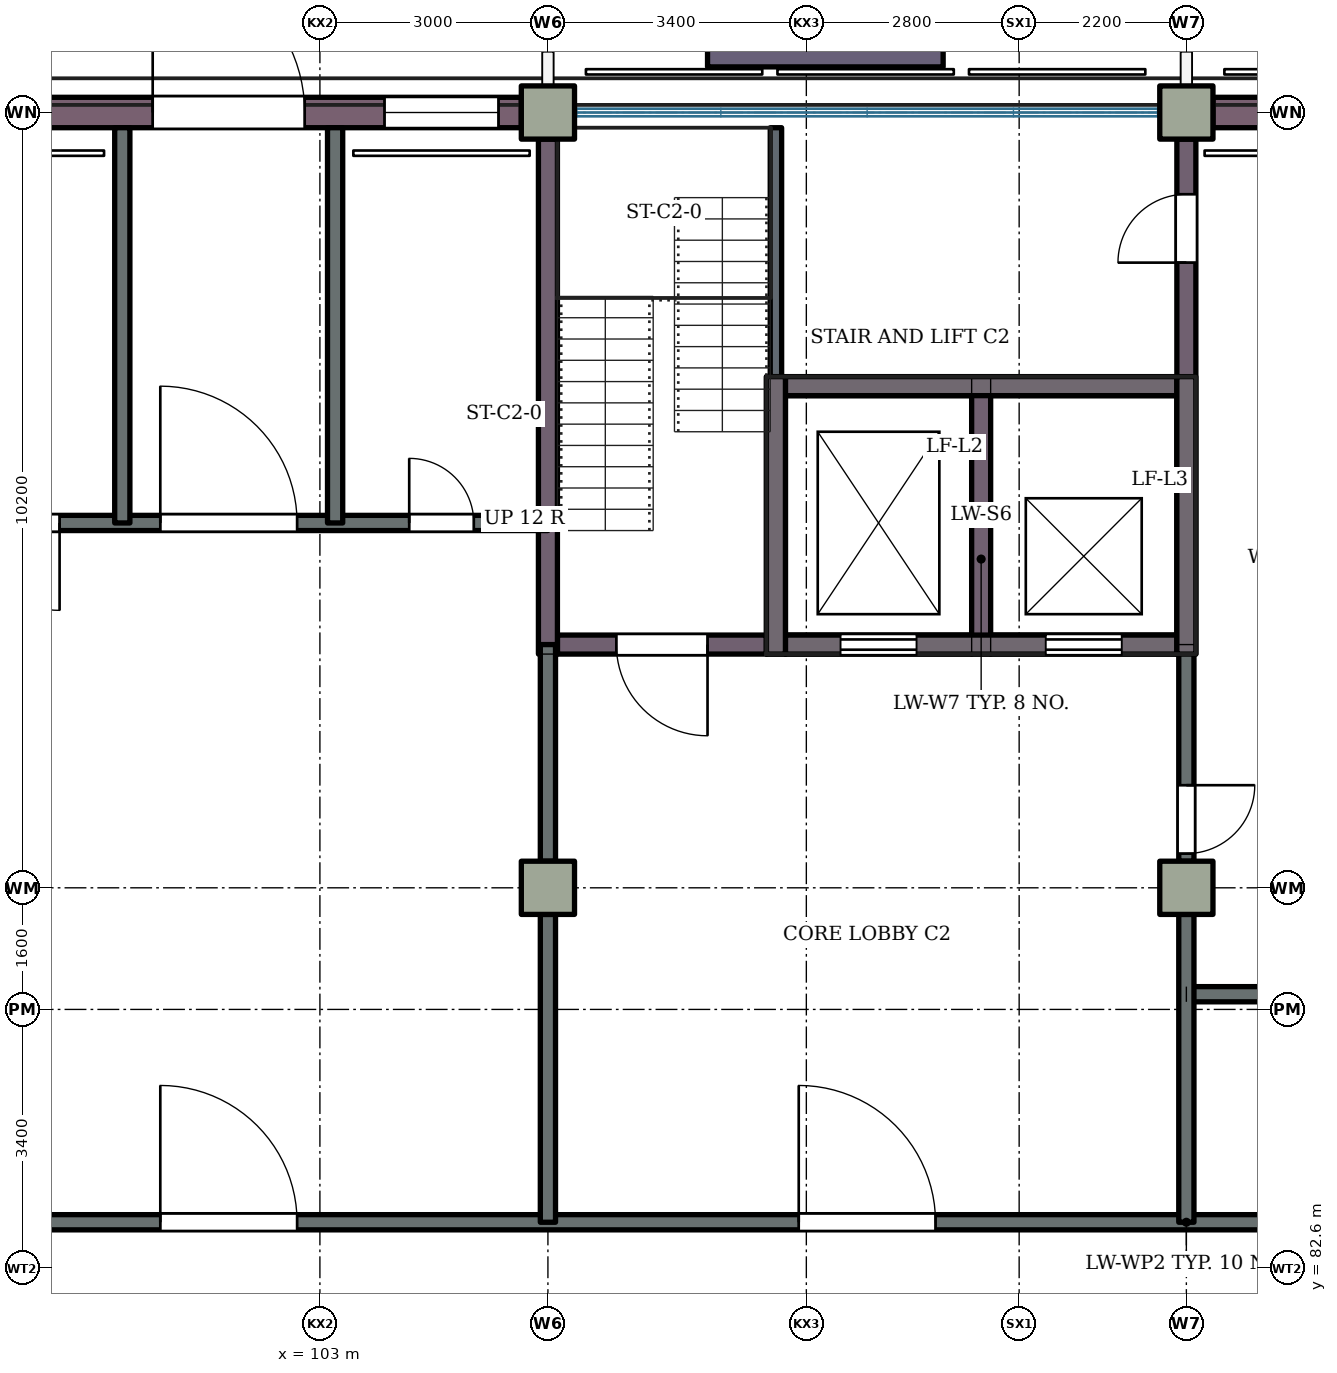
"""IFC4 building model, lengths in metres.
Left out: names, types, materials, properties, quantities, classifications, styles, units other than length and angle.
Written with IfcOpenShell. Run it as: python <this file> out.ifc"""

import sys

from ifc_helpers import new_model, si_unit, direction, frame, frame_2d, origin, origin_2d, place, context, subcontext, project, spatial, rectangle, extrude, element, fill, save


model = new_model("IFC4")
c1 = context("Model", 3, precision=1e-05, world=origin(), true_north=direction((0.0, 1.0)))
c2 = subcontext(c1, "Body", "Model", "MODEL_VIEW")
j1 = project(units=[si_unit("LENGTHUNIT", "METRE"), si_unit("PLANEANGLEUNIT", "RADIAN")], contexts=[c1])
p1 = place(None, origin())
s1 = spatial("IfcSite", under=j1, at=p1, CompositionType="ELEMENT")
p2 = place(p1, origin())
s2 = spatial("IfcBuilding", under=s1, at=p2, CompositionType="ELEMENT")
p3 = place(p2, origin())
s3 = spatial("IfcBuildingStorey", under=s2, at=p3, CompositionType="ELEMENT", Elevation=0.0)
for number, where, z_axis, x_axis in (
    (1, (106.0, 87.6, 0.0), (0.0, 0.0, 1.0), (1.0, 0.0, 0.0)),
    (2, (114.4, 87.6, 0.0), (0.0, 0.0, 1.0), (1.0, 0.0, 0.0)),
    (3, (106.0, 97.8, 0.0), (0.0, 0.0, 1.0), (1.0, 0.0, 0.0)),
    (4, (114.4, 97.8, 0.0), (0.0, 0.0, 1.0), (1.0, 0.0, 0.0)),
):
    element("IfcColumn", number, at=place(p3, frame(where, z_axis=z_axis, x_axis=x_axis)), inside=s3, PredefinedType="COLUMN", context=c2, shape_type="SweptSolid", body=[
        extrude(rectangle(XDim=0.7, YDim=0.7, at=origin_2d()), origin(), (0.0, 0.0, 1.0), 4.2),
    ])
p4 = place(p3, frame((106.125, 90.8, 0.0), z_axis=(0.0, 0.0, 1.0), x_axis=(1.0, 0.0, 0.0)))
e5 = element("IfcWall", 5, at=p4, inside=s3, PredefinedType="SHEAR", context=c2, shape_type="SweptSolid", body=[
    extrude(rectangle(XDim=2.75, YDim=0.25, at=frame_2d((1.375, 0.0))), origin(), (0.0, 0.0, 1.0), 4.2),
])
p5 = place(p4, frame((0.775, 0.0, 0.0)))
e6 = element("IfcOpeningElement", 6, at=p5, cuts=e5, PredefinedType="OPENING", context=c2, shape_type="SweptSolid", body=[
    extrude(rectangle(XDim=1.2, YDim=2.1, at=frame_2d((0.6, 1.05))), frame((0.0, 0.135, 0.0), z_axis=(0.0, -1.0, 0.0), x_axis=(1.0, 0.0, 0.0)), (0.0, 0.0, 1.0), 0.27),
])
p6 = place(p3, frame((109.125, 90.8, 0.0), z_axis=(0.0, 0.0, 1.0), x_axis=(1.0, 0.0, 0.0)))
e7 = element("IfcWall", 7, at=p6, inside=s3, PredefinedType="SHEAR", context=c2, shape_type="SweptSolid", body=[
    extrude(rectangle(XDim=2.45, YDim=0.25, at=frame_2d((1.225, 0.0))), origin(), (0.0, 0.0, 1.0), 4.2),
])
p7 = place(p6, frame((0.725, 0.0, 0.0)))
e8 = element("IfcOpeningElement", 8, at=p7, cuts=e7, PredefinedType="OPENING", context=c2, shape_type="SweptSolid", body=[
    extrude(rectangle(XDim=1.0, YDim=2.1, at=frame_2d((0.5, 1.05))), frame((0.0, 0.135, 0.0), z_axis=(0.0, -1.0, 0.0), x_axis=(1.0, 0.0, 0.0)), (0.0, 0.0, 1.0), 0.27),
])
p8 = place(p3, frame((111.825, 90.8, 0.0), z_axis=(0.0, 0.0, 1.0), x_axis=(1.0, 0.0, 0.0)))
e9 = element("IfcWall", 9, at=p8, inside=s3, PredefinedType="SHEAR", context=c2, shape_type="SweptSolid", body=[
    extrude(rectangle(XDim=2.45, YDim=0.25, at=frame_2d((1.225, 0.0))), origin(), (0.0, 0.0, 1.0), 4.2),
])
p9 = place(p8, frame((0.725, 0.0, 0.0)))
e10 = element("IfcOpeningElement", 10, at=p9, cuts=e9, PredefinedType="OPENING", context=c2, shape_type="SweptSolid", body=[
    extrude(rectangle(XDim=1.0, YDim=2.1, at=frame_2d((0.5, 1.05))), frame((0.0, 0.135, 0.0), z_axis=(0.0, -1.0, 0.0), x_axis=(1.0, 0.0, 0.0)), (0.0, 0.0, 1.0), 0.27),
])
for number, where, z_axis, x_axis in (
    (11, (109.125, 94.2, 0.0), (0.0, 0.0, 1.0), (1.0, 0.0, 0.0)),
    (12, (111.825, 94.2, 0.0), (0.0, 0.0, 1.0), (1.0, 0.0, 0.0)),
):
    element("IfcWall", number, at=place(p3, frame(where, z_axis=z_axis, x_axis=x_axis)), inside=s3, PredefinedType="SHEAR", context=c2, shape_type="SweptSolid", body=[
        extrude(rectangle(XDim=2.45, YDim=0.25, at=frame_2d((1.225, 0.0))), origin(), (0.0, 0.0, 1.0), 4.2),
    ])
p10 = place(p3, frame((106.0, 90.675, 0.0), z_axis=(0.0, 0.0, 1.0), x_axis=(0.0, 1.0, 0.0)))
e13 = element("IfcWall", 13, at=p10, inside=s3, PredefinedType="SHEAR", context=c2, shape_type="SweptSolid", body=[
    extrude(rectangle(XDim=6.775, YDim=0.25, at=frame_2d((3.387, 0.0))), origin(), (0.0, 0.0, 1.0), 4.2),
])
for number, where, z_axis, x_axis in (
    (14, (109.0, 90.675, 0.0), (0.0, 0.0, 1.0), (0.0, 1.0, 0.0)),
    (15, (111.7, 90.675, 0.0), (0.0, 0.0, 1.0), (0.0, 1.0, 0.0)),
):
    element("IfcWall", number, at=place(p3, frame(where, z_axis=z_axis, x_axis=x_axis)), inside=s3, PredefinedType="SHEAR", context=c2, shape_type="SweptSolid", body=[
        extrude(rectangle(XDim=3.65, YDim=0.25, at=frame_2d((1.825, 0.0))), origin(), (0.0, 0.0, 1.0), 4.2),
    ])
p11 = place(p3, frame((114.4, 90.675, 0.0), z_axis=(0.0, 0.0, 1.0), x_axis=(0.0, 1.0, 0.0)))
e16 = element("IfcWall", 16, at=p11, inside=s3, PredefinedType="SHEAR", context=c2, shape_type="SweptSolid", body=[
    extrude(rectangle(XDim=6.775, YDim=0.25, at=frame_2d((3.387, 0.0))), origin(), (0.0, 0.0, 1.0), 4.2),
])
p12 = place(p11, frame((5.15, 0.0, 0.0)))
e17 = element("IfcOpeningElement", 17, at=p12, cuts=e16, PredefinedType="OPENING", context=c2, shape_type="SweptSolid", body=[
    extrude(rectangle(XDim=0.9, YDim=2.1, at=frame_2d((0.45, 1.05))), frame((0.0, 0.135, 0.0), z_axis=(0.0, -1.0, 0.0), x_axis=(1.0, 0.0, 0.0)), (0.0, 0.0, 1.0), 0.27),
])
p13 = place(p3, frame((97.95, 97.8, 0.0), z_axis=(0.0, 0.0, 1.0), x_axis=(1.0, 0.0, 0.0)))
e18 = element("IfcWall", 18, at=p13, inside=s3, PredefinedType="SOLIDWALL", context=c2, shape_type="SweptSolid", body=[
    extrude(rectangle(XDim=7.7, YDim=0.4, at=frame_2d((3.85, 0.0))), origin(), (0.0, 0.0, 1.0), 3.32),
])
p14 = place(p13, frame((2.85, 0.0, 0.0)))
e19 = element("IfcOpeningElement", 19, at=p14, cuts=e18, PredefinedType="OPENING", context=c2, shape_type="SweptSolid", body=[
    extrude(rectangle(XDim=2.0, YDim=2.4, at=frame_2d((1.0, 1.2))), frame((0.0, 0.21, 0.0), z_axis=(0.0, -1.0, 0.0), x_axis=(1.0, 0.0, 0.0)), (0.0, 0.0, 1.0), 0.42),
])
p15 = place(p13, frame((0.675, 0.0, 2.1)))
e20 = element("IfcOpeningElement", 20, at=p15, cuts=e18, PredefinedType="OPENING", context=c2, shape_type="SweptSolid", body=[
    extrude(rectangle(XDim=0.75, YDim=0.9, at=frame_2d((0.375, 0.45))), frame((0.0, 0.21, 0.0), z_axis=(0.0, -1.0, 0.0), x_axis=(1.0, 0.0, 0.0)), (0.0, 0.0, 1.0), 0.42),
])
p16 = place(p13, frame((5.9, 0.0, 1.5)))
e21 = element("IfcOpeningElement", 21, at=p16, cuts=e18, PredefinedType="OPENING", context=c2, shape_type="SweptSolid", body=[
    extrude(rectangle(XDim=1.5, YDim=1.5, at=frame_2d((0.75, 0.75))), frame((0.0, 0.21, 0.0), z_axis=(0.0, -1.0, 0.0), x_axis=(1.0, 0.0, 0.0)), (0.0, 0.0, 1.0), 0.42),
])
p17 = place(p3, frame((114.75, 97.8, 0.0), z_axis=(0.0, 0.0, 1.0), x_axis=(1.0, 0.0, 0.0)))
e22 = element("IfcWall", 22, at=p17, inside=s3, PredefinedType="SOLIDWALL", context=c2, shape_type="SweptSolid", body=[
    extrude(rectangle(XDim=7.7, YDim=0.4, at=frame_2d((3.85, 0.0))), origin(), (0.0, 0.0, 1.0), 3.32),
])
p18 = place(p17, frame((0.75, 0.0, 2.1)))
e23 = element("IfcOpeningElement", 23, at=p18, cuts=e22, PredefinedType="OPENING", context=c2, shape_type="SweptSolid", body=[
    extrude(rectangle(XDim=0.6, YDim=0.9, at=frame_2d((0.3, 0.45))), frame((0.0, 0.21, 0.0), z_axis=(0.0, -1.0, 0.0), x_axis=(1.0, 0.0, 0.0)), (0.0, 0.0, 1.0), 0.42),
])
p19 = place(p17, frame((6.35, 0.0, 2.1)))
e24 = element("IfcOpeningElement", 24, at=p19, cuts=e22, PredefinedType="OPENING", context=c2, shape_type="SweptSolid", body=[
    extrude(rectangle(XDim=0.6, YDim=0.9, at=frame_2d((0.3, 0.45))), frame((0.0, 0.21, 0.0), z_axis=(0.0, -1.0, 0.0), x_axis=(1.0, 0.0, 0.0)), (0.0, 0.0, 1.0), 0.42),
])
p20 = place(p3, frame((108.1, 98.9, 0.0), z_axis=(0.0, 0.0, 1.0), x_axis=(1.0, 0.0, 0.0)))
e25 = element("IfcWall", 25, at=p20, inside=s3, PredefinedType="STANDARD", context=c2, shape_type="SweptSolid", body=[
    extrude(rectangle(XDim=3.1, YDim=1.0, at=frame_2d((1.55, 0.0))), origin(), (0.0, 0.0, 1.0), 4.2),
])
p21 = place(p3, frame((97.6, 83.2, 0.0), z_axis=(0.0, 0.0, 1.0), x_axis=(1.0, 0.0, 0.0)))
e26 = element("IfcWall", 26, at=p21, inside=s3, PredefinedType="PARTITIONING", context=c2, shape_type="SweptSolid", body=[
    extrude(rectangle(XDim=33.6, YDim=0.2, at=frame_2d((16.8, 0.0))), origin(), (0.0, 0.0, 1.0), 3.92),
])
p22 = place(p21, frame((3.3, 0.0, 0.0)))
e27 = element("IfcOpeningElement", 27, at=p22, cuts=e26, PredefinedType="OPENING", context=c2, shape_type="SweptSolid", body=[
    extrude(rectangle(XDim=1.8, YDim=2.1, at=frame_2d((0.9, 1.05))), frame((0.0, 0.11, 0.0), z_axis=(0.0, -1.0, 0.0), x_axis=(1.0, 0.0, 0.0)), (0.0, 0.0, 1.0), 0.22),
])
p23 = place(p21, frame((11.7, 0.0, 0.0)))
e28 = element("IfcOpeningElement", 28, at=p23, cuts=e26, PredefinedType="OPENING", context=c2, shape_type="SweptSolid", body=[
    extrude(rectangle(XDim=1.8, YDim=2.1, at=frame_2d((0.9, 1.05))), frame((0.0, 0.11, 0.0), z_axis=(0.0, -1.0, 0.0), x_axis=(1.0, 0.0, 0.0)), (0.0, 0.0, 1.0), 0.22),
])
p24 = place(p21, frame((20.1, 0.0, 0.0)))
e29 = element("IfcOpeningElement", 29, at=p24, cuts=e26, PredefinedType="OPENING", context=c2, shape_type="SweptSolid", body=[
    extrude(rectangle(XDim=1.8, YDim=2.1, at=frame_2d((0.9, 1.05))), frame((0.0, 0.11, 0.0), z_axis=(0.0, -1.0, 0.0), x_axis=(1.0, 0.0, 0.0)), (0.0, 0.0, 1.0), 0.22),
])
p25 = place(p21, frame((28.5, 0.0, 0.0)))
e30 = element("IfcOpeningElement", 30, at=p25, cuts=e26, PredefinedType="OPENING", context=c2, shape_type="SweptSolid", body=[
    extrude(rectangle(XDim=1.8, YDim=2.1, at=frame_2d((0.9, 1.05))), frame((0.0, 0.11, 0.0), z_axis=(0.0, -1.0, 0.0), x_axis=(1.0, 0.0, 0.0)), (0.0, 0.0, 1.0), 0.22),
])
p26 = place(p3, frame((114.4, 86.2, 0.0), z_axis=(0.0, 0.0, 1.0), x_axis=(1.0, 0.0, 0.0)))
e31 = element("IfcWall", 31, at=p26, inside=s3, PredefinedType="PARTITIONING", context=c2, shape_type="SweptSolid", body=[
    extrude(rectangle(XDim=8.4, YDim=0.2, at=frame_2d((4.2, 0.0))), origin(), (0.0, 0.0, 1.0), 3.92),
])
p27 = place(p26, frame((1.65, 0.0, 0.0)))
e32 = element("IfcOpeningElement", 32, at=p27, cuts=e31, PredefinedType="OPENING", context=c2, shape_type="SweptSolid", body=[
    extrude(rectangle(XDim=0.9, YDim=2.1, at=frame_2d((0.45, 1.05))), frame((0.0, 0.11, 0.0), z_axis=(0.0, -1.0, 0.0), x_axis=(1.0, 0.0, 0.0)), (0.0, 0.0, 1.0), 0.22),
])
p28 = place(p26, frame((4.35, 0.0, 0.0)))
e33 = element("IfcOpeningElement", 33, at=p28, cuts=e31, PredefinedType="OPENING", context=c2, shape_type="SweptSolid", body=[
    extrude(rectangle(XDim=0.9, YDim=2.1, at=frame_2d((0.45, 1.05))), frame((0.0, 0.11, 0.0), z_axis=(0.0, -1.0, 0.0), x_axis=(1.0, 0.0, 0.0)), (0.0, 0.0, 1.0), 0.22),
])
p29 = place(p3, frame((97.6, 92.4, 0.0), z_axis=(0.0, 0.0, 1.0), x_axis=(1.0, 0.0, 0.0)))
e34 = element("IfcWall", 34, at=p29, inside=s3, PredefinedType="PARTITIONING", context=c2, shape_type="SweptSolid", body=[
    extrude(rectangle(XDim=8.4, YDim=0.2, at=frame_2d((4.2, 0.0))), origin(), (0.0, 0.0, 1.0), 3.92),
])
p30 = place(p29, frame((0.825, 0.0, 0.0)))
e35 = element("IfcOpeningElement", 35, at=p30, cuts=e34, PredefinedType="OPENING", context=c2, shape_type="SweptSolid", body=[
    extrude(rectangle(XDim=1.15, YDim=2.1, at=frame_2d((0.575, 1.05))), frame((0.0, 0.11, 0.0), z_axis=(0.0, -1.0, 0.0), x_axis=(1.0, 0.0, 0.0)), (0.0, 0.0, 1.0), 0.22),
])
p31 = place(p29, frame((6.575, 0.0, 0.0)))
e36 = element("IfcOpeningElement", 36, at=p31, cuts=e34, PredefinedType="OPENING", context=c2, shape_type="SweptSolid", body=[
    extrude(rectangle(XDim=0.85, YDim=2.1, at=frame_2d((0.425, 1.05))), frame((0.0, 0.11, 0.0), z_axis=(0.0, -1.0, 0.0), x_axis=(1.0, 0.0, 0.0)), (0.0, 0.0, 1.0), 0.22),
])
p32 = place(p29, frame((3.3, 0.0, 0.0)))
e37 = element("IfcOpeningElement", 37, at=p32, cuts=e34, PredefinedType="OPENING", context=c2, shape_type="SweptSolid", body=[
    extrude(rectangle(XDim=1.8, YDim=2.1, at=frame_2d((0.9, 1.05))), frame((0.0, 0.11, 0.0), z_axis=(0.0, -1.0, 0.0), x_axis=(1.0, 0.0, 0.0)), (0.0, 0.0, 1.0), 0.22),
])
for number, where, z_axis, x_axis in (
    (38, (100.4, 92.4, 0.0), (0.0, 0.0, 1.0), (0.0, 1.0, 0.0)),
    (39, (103.2, 92.4, 0.0), (0.0, 0.0, 1.0), (0.0, 1.0, 0.0)),
):
    element("IfcWall", number, at=place(p3, frame(where, z_axis=z_axis, x_axis=x_axis)), inside=s3, PredefinedType="PARTITIONING", context=c2, shape_type="SweptSolid", body=[
        extrude(rectangle(XDim=5.2, YDim=0.2, at=frame_2d((2.6, 0.0))), origin(), (0.0, 0.0, 1.0), 3.92),
    ])
p33 = place(p3, frame((106.0, 83.2, 0.0), z_axis=(0.0, 0.0, 1.0), x_axis=(0.0, 1.0, 0.0)))
e40 = element("IfcWall", 40, at=p33, inside=s3, PredefinedType="PARTITIONING", context=c2, shape_type="SweptSolid", body=[
    extrude(rectangle(XDim=4.05, YDim=0.2, at=frame_2d((2.025, 0.0))), origin(), (0.0, 0.0, 1.0), 3.02),
])
p34 = place(p3, frame((106.0, 87.95, 0.0), z_axis=(0.0, 0.0, 1.0), x_axis=(0.0, 1.0, 0.0)))
e41 = element("IfcWall", 41, at=p34, inside=s3, PredefinedType="PARTITIONING", context=c2, shape_type="SweptSolid", body=[
    extrude(rectangle(XDim=2.85, YDim=0.2, at=frame_2d((1.425, 0.0))), origin(), (0.0, 0.0, 1.0), 3.02),
])
p35 = place(p3, frame((114.4, 83.2, 0.0), z_axis=(0.0, 0.0, 1.0), x_axis=(0.0, 1.0, 0.0)))
e42 = element("IfcWall", 42, at=p35, inside=s3, PredefinedType="PARTITIONING", context=c2, shape_type="SweptSolid", body=[
    extrude(rectangle(XDim=4.05, YDim=0.2, at=frame_2d((2.025, 0.0))), origin(), (0.0, 0.0, 1.0), 3.02),
])
p36 = place(p3, frame((114.4, 87.95, 0.0), z_axis=(0.0, 0.0, 1.0), x_axis=(0.0, 1.0, 0.0)))
e43 = element("IfcWall", 43, at=p36, inside=s3, PredefinedType="PARTITIONING", context=c2, shape_type="SweptSolid", body=[
    extrude(rectangle(XDim=2.85, YDim=0.2, at=frame_2d((1.425, 0.0))), origin(), (0.0, 0.0, 1.0), 3.02),
])
p37 = place(p36, frame((0.1, 0.0, 0.0)))
e44 = element("IfcOpeningElement", 44, at=p37, cuts=e43, PredefinedType="OPENING", context=c2, shape_type="SweptSolid", body=[
    extrude(rectangle(XDim=0.9, YDim=2.1, at=frame_2d((0.45, 1.05))), frame((0.0, 0.11, 0.0), z_axis=(0.0, -1.0, 0.0), x_axis=(1.0, 0.0, 0.0)), (0.0, 0.0, 1.0), 0.22),
])
p38 = place(p3, frame((109.0, 94.325, 0.0), z_axis=(0.0, 0.0, 1.0), x_axis=(0.0, 1.0, 0.0)))
e45 = element("IfcWall", 45, at=p38, inside=s3, PredefinedType="PARTITIONING", context=c2, shape_type="SweptSolid", body=[
    extrude(rectangle(XDim=3.275, YDim=0.15, at=frame_2d((1.638, 0.0))), origin(), (0.0, 0.0, 1.0), 3.92),
])
for number, where, z_axis, x_axis in (
    (46, (109.125, 90.8, -1.2), (0.0, 0.0, 1.0), (1.0, 0.0, 0.0)),
    (47, (109.125, 94.2, -1.2), (0.0, 0.0, 1.0), (1.0, 0.0, 0.0)),
):
    element("IfcWall", number, at=place(p3, frame(where, z_axis=z_axis, x_axis=x_axis)), inside=s3, PredefinedType="SOLIDWALL", context=c2, shape_type="SweptSolid", body=[
        extrude(rectangle(XDim=5.15, YDim=0.25, at=frame_2d((2.575, 0.0))), origin(), (0.0, 0.0, 1.0), 1.2),
    ])
for number, where, z_axis, x_axis in (
    (48, (109.0, 90.675, -1.2), (0.0, 0.0, 1.0), (0.0, 1.0, 0.0)),
    (49, (114.4, 90.675, -1.2), (0.0, 0.0, 1.0), (0.0, 1.0, 0.0)),
):
    element("IfcWall", number, at=place(p3, frame(where, z_axis=z_axis, x_axis=x_axis)), inside=s3, PredefinedType="SOLIDWALL", context=c2, shape_type="SweptSolid", body=[
        extrude(rectangle(XDim=3.65, YDim=0.25, at=frame_2d((1.825, 0.0))), origin(), (0.0, 0.0, 1.0), 1.2),
    ])
p39 = place(p14, origin())
e50 = element("IfcDoor", 50, at=p39, inside=s3, OperationType="DOUBLE_DOOR_SINGLE_SWING", PredefinedType="DOOR", context=c2, shape_type="SweptSolid", body=[
    extrude(rectangle(XDim=2.0, YDim=2.4, at=frame_2d((1.0, 1.2))), frame((0.0, 0.025, 0.0), z_axis=(0.0, -1.0, 0.0), x_axis=(1.0, 0.0, 0.0)), (0.0, 0.0, 1.0), 0.05),
])
fill(e19, e50)
p40 = place(p16, origin())
e51 = element("IfcWindow", 51, at=p40, inside=s3, PartitioningType="SINGLE_PANEL", PredefinedType="WINDOW", context=c2, shape_type="SweptSolid", body=[
    extrude(rectangle(XDim=1.5, YDim=1.5, at=frame_2d((0.75, 0.75))), frame((0.0, 0.03, 0.0), z_axis=(0.0, -1.0, 0.0), x_axis=(1.0, 0.0, 0.0)), (0.0, 0.0, 1.0), 0.06),
])
fill(e21, e51)
p41 = place(p30, origin())
e52 = element("IfcDoor", 52, at=p41, inside=s3, OperationType="SINGLE_SWING_RIGHT", PredefinedType="DOOR", context=c2, shape_type="SweptSolid", body=[
    extrude(rectangle(XDim=1.15, YDim=2.1, at=frame_2d((0.575, 1.05))), frame((0.0, 0.025, 0.0), z_axis=(0.0, -1.0, 0.0), x_axis=(1.0, 0.0, 0.0)), (0.0, 0.0, 1.0), 0.05),
])
fill(e35, e52)
p42 = place(p31, origin())
e53 = element("IfcDoor", 53, at=p42, inside=s3, OperationType="SINGLE_SWING_LEFT", PredefinedType="DOOR", context=c2, shape_type="SweptSolid", body=[
    extrude(rectangle(XDim=0.85, YDim=2.1, at=frame_2d((0.425, 1.05))), frame((0.0, 0.025, 0.0), z_axis=(0.0, -1.0, 0.0), x_axis=(1.0, 0.0, 0.0)), (0.0, 0.0, 1.0), 0.05),
])
fill(e36, e53)
p43 = place(p37, origin())
e54 = element("IfcDoor", 54, at=p43, inside=s3, OperationType="SINGLE_SWING_RIGHT", PredefinedType="DOOR", context=c2, shape_type="SweptSolid", body=[
    extrude(rectangle(XDim=0.9, YDim=2.1, at=frame_2d((0.45, 1.05))), frame((0.0, 0.025, 0.0), z_axis=(0.0, -1.0, 0.0), x_axis=(1.0, 0.0, 0.0)), (0.0, 0.0, 1.0), 0.05),
])
fill(e44, e54)
p44 = place(p12, origin())
e55 = element("IfcDoor", 55, at=p44, inside=s3, OperationType="SINGLE_SWING_LEFT", PredefinedType="DOOR", context=c2, shape_type="SweptSolid", body=[
    extrude(rectangle(XDim=0.9, YDim=2.1, at=frame_2d((0.45, 1.05))), frame((0.0, 0.025, 0.0), z_axis=(0.0, -1.0, 0.0), x_axis=(1.0, 0.0, 0.0)), (0.0, 0.0, 1.0), 0.05),
])
fill(e17, e55)
p45 = place(p32, origin())
e56 = element("IfcDoor", 56, at=p45, inside=s3, OperationType="DOUBLE_DOOR_SINGLE_SWING", PredefinedType="DOOR", context=c2, shape_type="SweptSolid", body=[
    extrude(rectangle(XDim=1.8, YDim=2.1, at=frame_2d((0.9, 1.05))), frame((0.0, 0.025, 0.0), z_axis=(0.0, -1.0, 0.0), x_axis=(1.0, 0.0, 0.0)), (0.0, 0.0, 1.0), 0.05),
])
fill(e37, e56)
p46 = place(p22, origin())
e57 = element("IfcDoor", 57, at=p46, inside=s3, OperationType="DOUBLE_DOOR_SINGLE_SWING", PredefinedType="DOOR", context=c2, shape_type="SweptSolid", body=[
    extrude(rectangle(XDim=1.8, YDim=2.1, at=frame_2d((0.9, 1.05))), frame((0.0, 0.025, 0.0), z_axis=(0.0, -1.0, 0.0), x_axis=(1.0, 0.0, 0.0)), (0.0, 0.0, 1.0), 0.05),
])
fill(e27, e57)
p47 = place(p23, origin())
e58 = element("IfcDoor", 58, at=p47, inside=s3, OperationType="DOUBLE_DOOR_SINGLE_SWING", PredefinedType="DOOR", context=c2, shape_type="SweptSolid", body=[
    extrude(rectangle(XDim=1.8, YDim=2.1, at=frame_2d((0.9, 1.05))), frame((0.0, 0.025, 0.0), z_axis=(0.0, -1.0, 0.0), x_axis=(1.0, 0.0, 0.0)), (0.0, 0.0, 1.0), 0.05),
])
fill(e28, e58)
p48 = place(p5, origin())
e59 = element("IfcDoor", 59, at=p48, inside=s3, OperationType="SINGLE_SWING_RIGHT", PredefinedType="DOOR", context=c2, shape_type="SweptSolid", body=[
    extrude(rectangle(XDim=1.2, YDim=2.1, at=frame_2d((0.6, 1.05))), frame((0.0, 0.025, 0.0), z_axis=(0.0, -1.0, 0.0), x_axis=(1.0, 0.0, 0.0)), (0.0, 0.0, 1.0), 0.05),
])
fill(e6, e59)
p49 = place(p7, origin())
e60 = element("IfcDoor", 60, at=p49, inside=s3, OperationType="SLIDING_TO_LEFT", PredefinedType="DOOR", context=c2, shape_type="SweptSolid", body=[
    extrude(rectangle(XDim=1.0, YDim=2.1, at=frame_2d((0.5, 1.05))), frame((0.0, 0.025, 0.0), z_axis=(0.0, -1.0, 0.0), x_axis=(1.0, 0.0, 0.0)), (0.0, 0.0, 1.0), 0.05),
])
fill(e8, e60)
p50 = place(p9, origin())
e61 = element("IfcDoor", 61, at=p50, inside=s3, OperationType="SLIDING_TO_LEFT", PredefinedType="DOOR", context=c2, shape_type="SweptSolid", body=[
    extrude(rectangle(XDim=1.0, YDim=2.1, at=frame_2d((0.5, 1.05))), frame((0.0, 0.025, 0.0), z_axis=(0.0, -1.0, 0.0), x_axis=(1.0, 0.0, 0.0)), (0.0, 0.0, 1.0), 0.05),
])
fill(e10, e61)
save(model, sys.argv[1])
